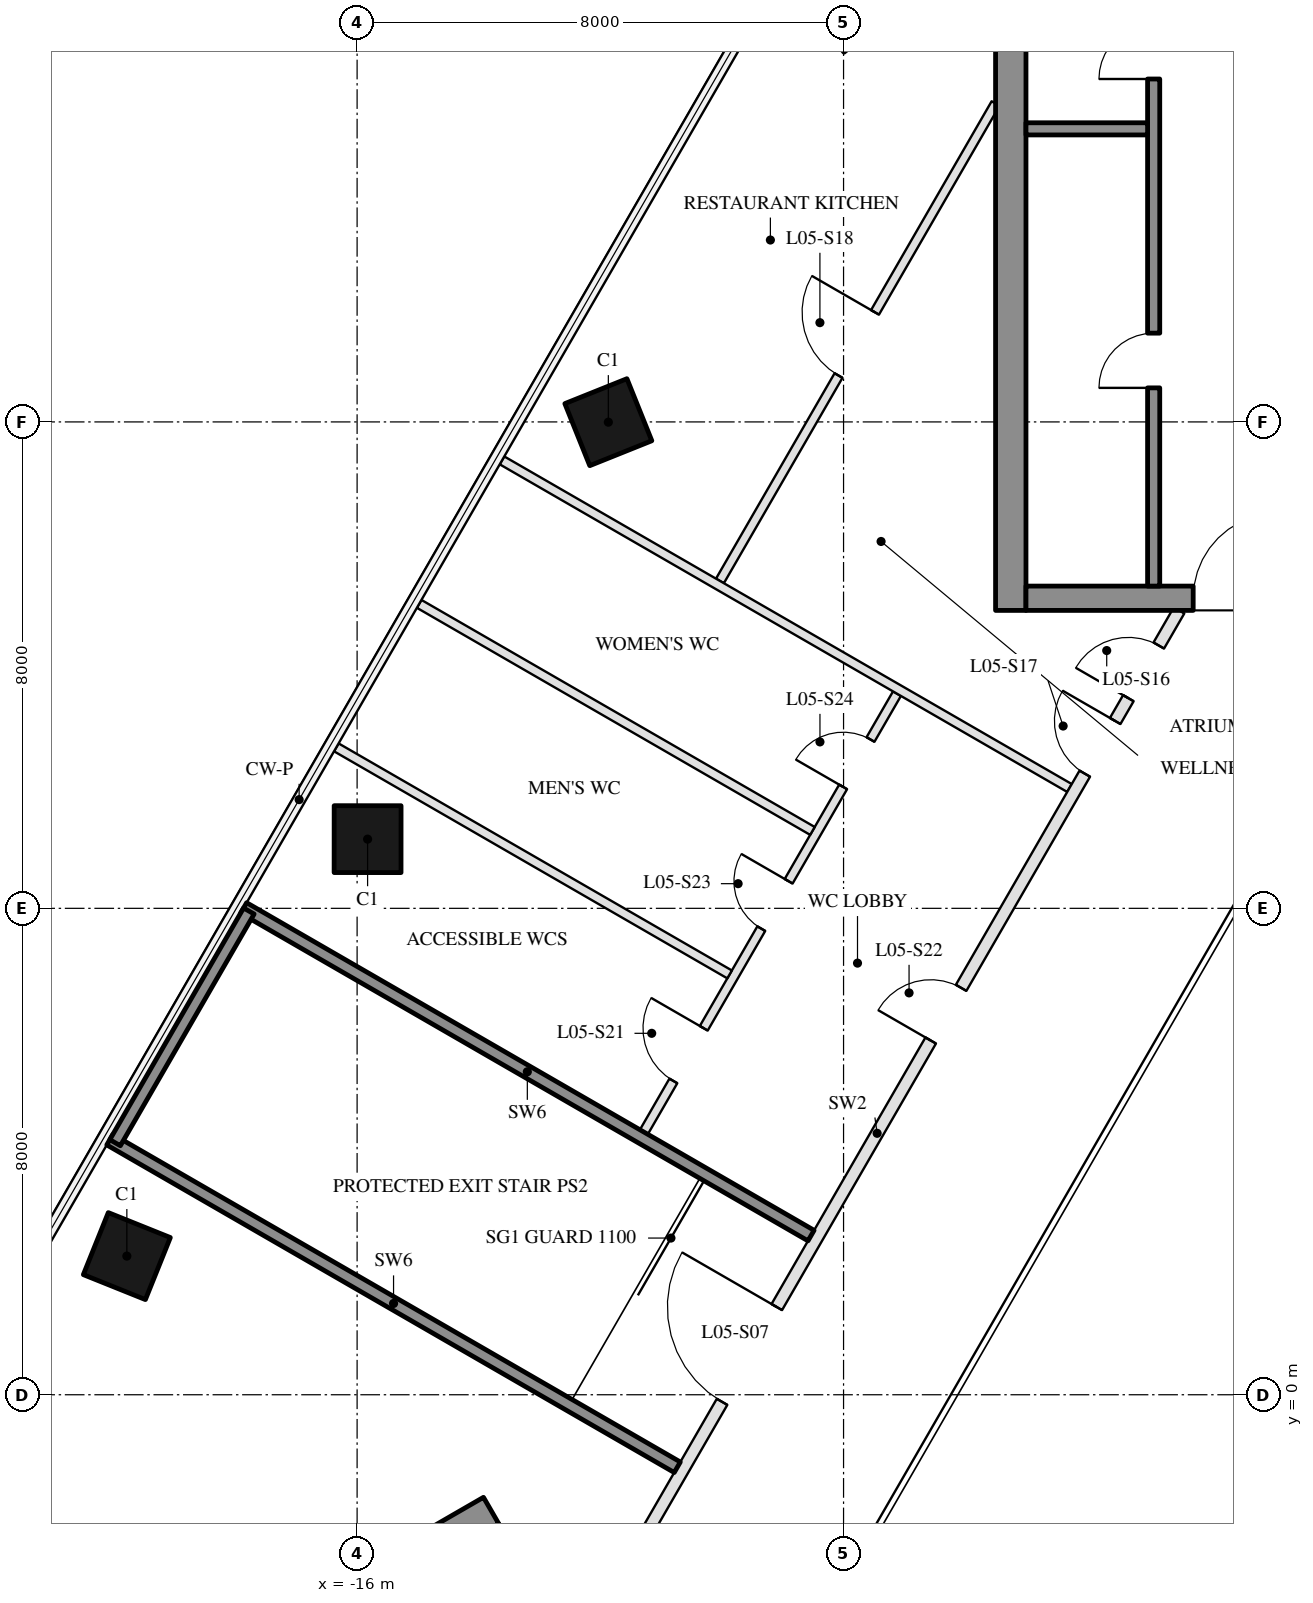
"""IFC4 building model, lengths in metres.
Left out: names, types, materials, properties, quantities, classifications, styles, units other than length and angle.
Written with IfcOpenShell. Run it as: python <this file> out.ifc"""

import sys

from ifc_helpers import new_model, si_unit, direction, frame, frame_2d, origin, origin_2d, place, context, subcontext, project, spatial, rectangle, hollow_rectangle, extrude, boolean, halfspace, element, fill, save


model = new_model("IFC4")
c1 = context("Model", 3, precision=1e-05, world=origin(), true_north=direction((0.0, 1.0)))
c2 = subcontext(c1, "Body", "Model", "MODEL_VIEW")
j1 = project(units=[si_unit("LENGTHUNIT", "METRE"), si_unit("PLANEANGLEUNIT", "RADIAN")], contexts=[c1])
p1 = place(None, origin())
s1 = spatial("IfcSite", under=j1, at=p1, CompositionType="ELEMENT")
p2 = place(p1, origin())
s2 = spatial("IfcBuilding", under=s1, at=p2, CompositionType="ELEMENT")
p3 = place(p2, frame((0.0, 0.0, 33.0)))
s3 = spatial("IfcBuildingStorey", under=s2, at=p3, CompositionType="ELEMENT", Elevation=33.0)
p4 = place(p3, frame((-7.909, 22.854, 0.0), z_axis=(0.004719641607, -0.012314467182, 0.999913035659), x_axis=(0.503343741395, 0.864046735596, 0.008265391899)))
e1 = element("IfcColumn", 1, at=p4, inside=s3, PredefinedType="COLUMN", context=c2, shape_type="SweptSolid", body=[
    boolean("DIFFERENCE", boolean("DIFFERENCE", extrude(hollow_rectangle(XDim=1.1, YDim=1.1, WallThickness=0.05, at=origin_2d()), origin(), (0.0, 0.0, 1.0), 4.5), halfspace(frame((0.0, 0.0, 0.012), z_axis=(0.0, 0.0, 1.0), x_axis=(1.0, 0.0, 0.0)), True)), halfspace(frame((0.0, 0.0, 4.493), z_axis=(0.0, 0.0, 1.0), x_axis=(1.0, 0.0, 0.0)), False)),
])
p5 = place(p3, frame((-11.868, 15.996, 0.0), z_axis=(0.006835520265, -0.008680025734, 0.999938964545), x_axis=(0.498767584387, 0.866726006756, 0.004114119219)))
e2 = element("IfcColumn", 2, at=p5, inside=s3, PredefinedType="COLUMN", context=c2, shape_type="SweptSolid", body=[
    boolean("DIFFERENCE", boolean("DIFFERENCE", extrude(hollow_rectangle(XDim=1.1, YDim=1.1, WallThickness=0.05, at=origin_2d()), origin(), (0.0, 0.0, 1.0), 4.5), halfspace(frame((0.0, 0.0, 0.01), z_axis=(0.0, 0.0, 1.0), x_axis=(1.0, 0.0, 0.0)), True)), halfspace(frame((0.0, 0.0, 4.494), z_axis=(0.0, 0.0, 1.0), x_axis=(1.0, 0.0, 0.0)), False)),
])
p6 = place(p3, frame((-15.827, 9.138, 0.0), z_axis=(0.008842855216, -0.005099560677, 0.999947897839), x_axis=(-0.500158591732, -0.865933821414, 6.948309e-06)))
e3 = element("IfcColumn", 3, at=p6, inside=s3, PredefinedType="COLUMN", context=c2, shape_type="SweptSolid", body=[
    boolean("DIFFERENCE", boolean("DIFFERENCE", extrude(hollow_rectangle(XDim=1.1, YDim=1.1, WallThickness=0.05, at=origin_2d()), origin(), (0.0, 0.0, 1.0), 4.5), halfspace(frame((0.0, 0.0, 0.01), z_axis=(0.0, 0.0, 1.0), x_axis=(1.0, 0.0, 0.0)), True)), halfspace(frame((0.0, 0.0, 4.494), z_axis=(0.0, 0.0, 1.0), x_axis=(1.0, 0.0, 0.0)), False)),
])
p7 = place(p3, frame((-19.787, 2.281, 0.0), z_axis=(0.010958529764, -0.001573254273, 0.99993871587), x_axis=(-0.501077464826, -0.865392580649, 0.004129842831)))
e4 = element("IfcColumn", 4, at=p7, inside=s3, PredefinedType="COLUMN", context=c2, shape_type="SweptSolid", body=[
    boolean("DIFFERENCE", boolean("DIFFERENCE", extrude(hollow_rectangle(XDim=1.1, YDim=1.1, WallThickness=0.05, at=origin_2d()), origin(), (0.0, 0.0, 1.0), 4.5), halfspace(frame((0.0, 0.0, 0.01), z_axis=(0.0, 0.0, 1.0), x_axis=(1.0, 0.0, 0.0)), True)), halfspace(frame((0.0, 0.0, 4.494), z_axis=(0.0, 0.0, 1.0), x_axis=(1.0, 0.0, 0.0)), False)),
])
p8 = place(p3, frame((-5.25, 12.9, 0.0), z_axis=(0.0, 0.0, 1.0), x_axis=(0.0, 1.0, 0.0)))
e5 = element("IfcWall", 5, at=p8, inside=s3, PredefinedType="SHEAR", context=c2, shape_type="SweptSolid", body=[
    extrude(rectangle(XDim=14.91, YDim=0.5, at=frame_2d((7.455, 0.0))), origin(), (0.0, 0.0, 1.0), 4.2),
])
p9 = place(p3, frame((5.0, 13.1, 0.0), z_axis=(0.0, 0.0, 1.0), x_axis=(-1.0, 0.0, 0.0)))
e6 = element("IfcWall", 6, at=p9, inside=s3, PredefinedType="SHEAR", context=c2, shape_type="SweptSolid", body=[
    extrude(rectangle(XDim=10.0, YDim=0.4, at=frame_2d((5.0, 0.0))), origin(), (0.0, 0.0, 1.0), 4.2),
])
p10 = place(p9, frame((3.55, 0.0, 0.0)))
e7 = element("IfcOpeningElement", 7, at=p10, cuts=e6, PredefinedType="OPENING", context=c2, shape_type="SweptSolid", body=[
    extrude(rectangle(XDim=1.1, YDim=2.1, at=frame_2d((0.55, 1.05))), frame((0.0, 0.21, 0.0), z_axis=(0.0, -1.0, 0.0), x_axis=(1.0, 0.0, 0.0)), (0.0, 0.0, 1.0), 0.42),
])
p11 = place(p9, frame((5.85, 0.0, 0.0)))
e8 = element("IfcOpeningElement", 8, at=p11, cuts=e6, PredefinedType="OPENING", context=c2, shape_type="SweptSolid", body=[
    extrude(rectangle(XDim=1.4, YDim=2.1, at=frame_2d((0.7, 1.05))), frame((0.0, 0.21, 0.0), z_axis=(0.0, -1.0, 0.0), x_axis=(1.0, 0.0, 0.0)), (0.0, 0.0, 1.0), 0.42),
])
p12 = place(p3, frame((-2.9, 13.3, 0.0), z_axis=(0.0, 0.0, 1.0), x_axis=(0.0, 1.0, 0.0)))
e9 = element("IfcWall", 9, at=p12, inside=s3, PredefinedType="SHEAR", context=c2, shape_type="SweptSolid", body=[
    extrude(rectangle(XDim=12.6, YDim=0.2, at=frame_2d((6.3, 0.0))), origin(), (0.0, 0.0, 1.0), 4.2),
])
p13 = place(p12, frame((3.26, 0.0, 0.0)))
e10 = element("IfcOpeningElement", 10, at=p13, cuts=e9, PredefinedType="OPENING", context=c2, shape_type="SweptSolid", body=[
    extrude(rectangle(XDim=0.9, YDim=2.1, at=frame_2d((0.45, 1.05))), frame((0.0, 0.11, 0.0), z_axis=(0.0, -1.0, 0.0), x_axis=(1.0, 0.0, 0.0)), (0.0, 0.0, 1.0), 0.22),
])
p14 = place(p12, frame((8.34, 0.0, 0.0)))
e11 = element("IfcOpeningElement", 11, at=p14, cuts=e9, PredefinedType="OPENING", context=c2, shape_type="SweptSolid", body=[
    extrude(rectangle(XDim=0.9, YDim=2.1, at=frame_2d((0.45, 1.05))), frame((0.0, 0.11, 0.0), z_axis=(0.0, -1.0, 0.0), x_axis=(1.0, 0.0, 0.0)), (0.0, 0.0, 1.0), 0.22),
])
p15 = place(p12, frame((10.51, 0.0, 0.0)))
e12 = element("IfcOpeningElement", 12, at=p15, cuts=e9, PredefinedType="OPENING", context=c2, shape_type="SweptSolid", body=[
    extrude(rectangle(XDim=0.9, YDim=2.1, at=frame_2d((0.45, 1.05))), frame((0.0, 0.11, 0.0), z_axis=(0.0, -1.0, 0.0), x_axis=(1.0, 0.0, 0.0)), (0.0, 0.0, 1.0), 0.22),
])
p16 = place(p3, frame((-3.0, 20.82, 0.0), z_axis=(0.0, 0.0, 1.0), x_axis=(-1.0, 0.0, 0.0)))
e13 = element("IfcWall", 13, at=p16, inside=s3, PredefinedType="SHEAR", context=c2, shape_type="SweptSolid", body=[
    extrude(rectangle(XDim=2.0, YDim=0.2, at=frame_2d((1.0, 0.0))), origin(), (0.0, 0.0, 1.0), 4.2),
])
p17 = place(p3, frame((-13.797, -1.903, 0.0), z_axis=(0.0, 0.0, 1.0), x_axis=(-0.866025798973, -0.499999315512, 0.0)))
e14 = element("IfcWall", 14, at=p17, inside=s3, PredefinedType="SHEAR", context=c2, shape_type="SweptSolid", body=[
    extrude(rectangle(XDim=14.91, YDim=0.5, at=frame_2d((7.455, 0.0))), origin(), (0.0, 0.0, 1.0), 4.2),
])
p18 = place(p3, frame((-5.5, 21.236, 0.0), z_axis=(0.0, 0.0, 1.0), x_axis=(-0.499999852422, -0.866025488988, 0.0)))
e15 = element("IfcWall", 15, at=p18, inside=s3, PredefinedType="PARTITIONING", context=c2, shape_type="SweptSolid", body=[
    extrude(rectangle(XDim=9.066, YDim=0.15, at=frame_2d((4.533, 0.0))), origin(), (0.0, 0.0, 1.0), 3.51),
])
p19 = place(p18, frame((3.965, 0.0, 0.0)))
e16 = element("IfcOpeningElement", 16, at=p19, cuts=e15, PredefinedType="OPENING", context=c2, shape_type="SweptSolid", body=[
    extrude(rectangle(XDim=1.2, YDim=2.1, at=frame_2d((0.6, 1.05))), frame((0.0, 0.085, 0.0), z_axis=(0.0, -1.0, 0.0), x_axis=(1.0, 0.0, 0.0)), (0.0, 0.0, 1.0), 0.17),
])
p20 = place(p3, frame((-7.122, 11.531, 0.0), z_axis=(0.0, 0.0, 1.0), x_axis=(-0.500018619731, -0.866014653411, 0.0)))
e17 = element("IfcWall", 17, at=p20, inside=s3, PredefinedType="PARTITIONING", context=c2, shape_type="SweptSolid", body=[
    extrude(rectangle(XDim=8.325, YDim=0.15, at=frame_2d((4.163, 0.0))), origin(), (0.0, 0.0, 1.0), 3.41),
])
p21 = place(p20, frame((6.354, 0.0, 0.0)))
e18 = element("IfcOpeningElement", 18, at=p21, cuts=e17, PredefinedType="OPENING", context=c2, shape_type="SweptSolid", body=[
    extrude(rectangle(XDim=1.0, YDim=2.1, at=frame_2d((0.5, 1.05))), frame((0.0, 0.085, 0.0), z_axis=(0.0, -1.0, 0.0), x_axis=(1.0, 0.0, 0.0)), (0.0, 0.0, 1.0), 0.17),
])
p22 = place(p20, frame((3.562, 0.0, 0.0)))
e19 = element("IfcOpeningElement", 19, at=p22, cuts=e17, PredefinedType="OPENING", context=c2, shape_type="SweptSolid", body=[
    extrude(rectangle(XDim=0.9, YDim=2.1, at=frame_2d((0.45, 1.05))), frame((0.0, 0.085, 0.0), z_axis=(0.0, -1.0, 0.0), x_axis=(1.0, 0.0, 0.0)), (0.0, 0.0, 1.0), 0.17),
])
p23 = place(p20, frame((0.871, 0.0, 0.0)))
e20 = element("IfcOpeningElement", 20, at=p23, cuts=e17, PredefinedType="OPENING", context=c2, shape_type="SweptSolid", body=[
    extrude(rectangle(XDim=0.9, YDim=2.1, at=frame_2d((0.45, 1.05))), frame((0.0, 0.085, 0.0), z_axis=(0.0, -1.0, 0.0), x_axis=(1.0, 0.0, 0.0)), (0.0, 0.0, 1.0), 0.17),
])
p24 = place(p3, frame((-13.617, 15.367, 0.0), z_axis=(0.0, 0.0, 1.0), x_axis=(0.866027503583, -0.499996363024, 0.0)))
e21 = element("IfcWall", 21, at=p24, inside=s3, PredefinedType="PARTITIONING", context=c2, shape_type="SweptSolid", body=[
    extrude(rectangle(XDim=10.776, YDim=0.15, at=frame_2d((5.388, 0.0))), origin(), (0.0, 0.0, 1.0), 4.2),
])
p25 = place(p3, frame((-14.979, 13.007, 0.0), z_axis=(0.0, 0.0, 1.0), x_axis=(0.866019543016, -0.500010151011, 0.0)))
e22 = element("IfcWall", 22, at=p25, inside=s3, PredefinedType="PARTITIONING", context=c2, shape_type="SweptSolid", body=[
    extrude(rectangle(XDim=7.468, YDim=0.15, at=frame_2d((3.734, 0.0))), origin(), (0.0, 0.0, 1.0), 3.41),
])
p26 = place(p3, frame((-16.342, 10.647, 0.0), z_axis=(0.0, 0.0, 1.0), x_axis=(0.866013560478, -0.500020512648, 0.0)))
e23 = element("IfcWall", 23, at=p26, inside=s3, PredefinedType="PARTITIONING", context=c2, shape_type="SweptSolid", body=[
    extrude(rectangle(XDim=7.469, YDim=0.15, at=frame_2d((3.734, 0.0))), origin(), (0.0, 0.0, 1.0), 4.2),
])
p27 = place(p3, frame((-17.867, 8.006, 0.0), z_axis=(0.0, 0.0, 1.0), x_axis=(0.866017693218, -0.500013354855, 0.0)))
e24 = element("IfcWall", 24, at=p27, inside=s3, PredefinedType="SOLIDWALL", context=c2, shape_type="SweptSolid", body=[
    extrude(rectangle(XDim=10.776, YDim=0.2, at=frame_2d((5.388, 0.0))), origin(), (0.0, 0.0, 1.0), 4.2),
])
p28 = place(p3, frame((-20.067, 4.196, 0.0), z_axis=(0.0, 0.0, 1.0), x_axis=(0.866023357302, -0.500003544594, 0.0)))
e25 = element("IfcWall", 25, at=p28, inside=s3, PredefinedType="SOLIDWALL", context=c2, shape_type="SweptSolid", body=[
    extrude(rectangle(XDim=10.776, YDim=0.2, at=frame_2d((5.388, 0.0))), origin(), (0.0, 0.0, 1.0), 4.2),
])
p29 = place(p3, frame((-2.482, 12.9, 0.0), z_axis=(0.0, 0.0, 1.0), x_axis=(-0.50000478328, -0.866022642139, 0.0)))
e26 = element("IfcWall", 26, at=p29, inside=s3, PredefinedType="PARTITIONING", context=c2, shape_type="SweptSolid", body=[
    extrude(rectangle(XDim=19.861, YDim=0.2, at=frame_2d((9.931, 0.0))), origin(), (0.0, 0.0, 1.0), 3.41),
])
p30 = place(p29, frame((13.23, 0.0, 0.0)))
e27 = element("IfcOpeningElement", 27, at=p30, cuts=e26, PredefinedType="OPENING", context=c2, shape_type="SweptSolid", body=[
    extrude(rectangle(XDim=1.8, YDim=2.1, at=frame_2d((0.9, 1.05))), frame((0.0, 0.11, 0.0), z_axis=(0.0, -1.0, 0.0), x_axis=(1.0, 0.0, 0.0)), (0.0, 0.0, 1.0), 0.22),
])
p31 = place(p29, frame((0.667, 0.0, 0.0)))
e28 = element("IfcOpeningElement", 28, at=p31, cuts=e26, PredefinedType="OPENING", context=c2, shape_type="SweptSolid", body=[
    extrude(rectangle(XDim=1.0, YDim=2.1, at=frame_2d((0.5, 1.05))), frame((0.0, 0.11, 0.0), z_axis=(0.0, -1.0, 0.0), x_axis=(1.0, 0.0, 0.0)), (0.0, 0.0, 1.0), 0.22),
])
p32 = place(p29, frame((2.1, 0.0, 0.0)))
e29 = element("IfcOpeningElement", 29, at=p32, cuts=e26, PredefinedType="OPENING", context=c2, shape_type="SweptSolid", body=[
    extrude(rectangle(XDim=1.0, YDim=2.1, at=frame_2d((0.5, 1.05))), frame((0.0, 0.11, 0.0), z_axis=(0.0, -1.0, 0.0), x_axis=(1.0, 0.0, 0.0)), (0.0, 0.0, 1.0), 0.22),
])
p33 = place(p29, frame((17.49, 0.0, 0.0)))
e30 = element("IfcOpeningElement", 30, at=p33, cuts=e26, PredefinedType="OPENING", context=c2, shape_type="SweptSolid", body=[
    extrude(rectangle(XDim=1.2, YDim=2.1, at=frame_2d((0.6, 1.05))), frame((0.0, 0.11, 0.0), z_axis=(0.0, -1.0, 0.0), x_axis=(1.0, 0.0, 0.0)), (0.0, 0.0, 1.0), 0.22),
])
p34 = place(p29, frame((7.168, 0.0, 0.0)))
e31 = element("IfcOpeningElement", 31, at=p34, cuts=e26, PredefinedType="OPENING", context=c2, shape_type="SweptSolid", body=[
    extrude(rectangle(XDim=1.0, YDim=2.1, at=frame_2d((0.5, 1.05))), frame((0.0, 0.11, 0.0), z_axis=(0.0, -1.0, 0.0), x_axis=(1.0, 0.0, 0.0)), (0.0, 0.0, 1.0), 0.22),
])
p35 = place(p3, frame((-17.78, 7.956, 0.0), z_axis=(0.0, 0.0, 1.0), x_axis=(-0.499988222896, -0.866032203192, 0.0)))
e32 = element("IfcWall", 32, at=p35, inside=s3, PredefinedType="SOLIDWALL", context=c2, shape_type="SweptSolid", body=[
    extrude(rectangle(XDim=4.4, YDim=0.2, at=frame_2d((2.2, 0.0))), origin(), (0.0, 0.0, 1.0), 4.2),
])
p36 = place(p13, origin())
e33 = element("IfcDoor", 33, at=p36, inside=s3, OperationType="SINGLE_SWING_LEFT", PredefinedType="DOOR", context=c2, shape_type="SweptSolid", body=[
    extrude(rectangle(XDim=0.9, YDim=2.1, at=frame_2d((0.45, 1.05))), frame((0.0, 0.025, 0.0), z_axis=(0.0, -1.0, 0.0), x_axis=(1.0, 0.0, 0.0)), (0.0, 0.0, 1.0), 0.05),
])
fill(e10, e33)
p37 = place(p14, origin())
e34 = element("IfcDoor", 34, at=p37, inside=s3, OperationType="SINGLE_SWING_LEFT", PredefinedType="DOOR", context=c2, shape_type="SweptSolid", body=[
    extrude(rectangle(XDim=0.9, YDim=2.1, at=frame_2d((0.45, 1.05))), frame((0.0, 0.025, 0.0), z_axis=(0.0, -1.0, 0.0), x_axis=(1.0, 0.0, 0.0)), (0.0, 0.0, 1.0), 0.05),
])
fill(e11, e34)
p38 = place(p11, frame((1.4, 0.0, 0.0), z_axis=(0.0, 0.0, 1.0), x_axis=(-1.0, 0.0, 0.0)))
e35 = element("IfcDoor", 35, at=p38, inside=s3, OperationType="DOUBLE_DOOR_SINGLE_SWING", PredefinedType="DOOR", context=c2, shape_type="SweptSolid", body=[
    extrude(rectangle(XDim=1.4, YDim=2.1, at=frame_2d((0.7, 1.05))), frame((0.0, 0.025, 0.0), z_axis=(0.0, -1.0, 0.0), x_axis=(1.0, 0.0, 0.0)), (0.0, 0.0, 1.0), 0.05),
])
fill(e8, e35)
p39 = place(p30, frame((1.8, 0.0, 0.0), z_axis=(0.0, 0.0, 1.0), x_axis=(-1.0, 0.0, 0.0)))
e36 = element("IfcDoor", 36, at=p39, inside=s3, OperationType="DOUBLE_DOOR_SINGLE_SWING", PredefinedType="DOOR", context=c2, shape_type="SweptSolid", body=[
    extrude(rectangle(XDim=1.8, YDim=2.1, at=frame_2d((0.9, 1.05))), frame((0.0, 0.025, 0.0), z_axis=(0.0, -1.0, 0.0), x_axis=(1.0, 0.0, 0.0)), (0.0, 0.0, 1.0), 0.05),
])
fill(e27, e36)
p40 = place(p31, frame((1.0, 0.0, 0.0), z_axis=(0.0, 0.0, 1.0), x_axis=(-1.0, 0.0, 0.0)))
e37 = element("IfcDoor", 37, at=p40, inside=s3, OperationType="SINGLE_SWING_LEFT", PredefinedType="DOOR", context=c2, shape_type="SweptSolid", body=[
    extrude(rectangle(XDim=1.0, YDim=2.1, at=frame_2d((0.5, 1.05))), frame((0.0, 0.025, 0.0), z_axis=(0.0, -1.0, 0.0), x_axis=(1.0, 0.0, 0.0)), (0.0, 0.0, 1.0), 0.05),
])
fill(e28, e37)
p41 = place(p32, frame((1.0, 0.0, 0.0), z_axis=(0.0, 0.0, 1.0), x_axis=(-1.0, 0.0, 0.0)))
e38 = element("IfcDoor", 38, at=p41, inside=s3, OperationType="SINGLE_SWING_RIGHT", PredefinedType="DOOR", context=c2, shape_type="SweptSolid", body=[
    extrude(rectangle(XDim=1.0, YDim=2.1, at=frame_2d((0.5, 1.05))), frame((0.0, 0.025, 0.0), z_axis=(0.0, -1.0, 0.0), x_axis=(1.0, 0.0, 0.0)), (0.0, 0.0, 1.0), 0.05),
])
fill(e29, e38)
p42 = place(p19, frame((1.2, 0.0, 0.0), z_axis=(0.0, 0.0, 1.0), x_axis=(-1.0, 0.0, 0.0)))
e39 = element("IfcDoor", 39, at=p42, inside=s3, OperationType="SINGLE_SWING_RIGHT", PredefinedType="DOOR", context=c2, shape_type="SweptSolid", body=[
    extrude(rectangle(XDim=1.2, YDim=2.1, at=frame_2d((0.6, 1.05))), frame((0.0, 0.025, 0.0), z_axis=(0.0, -1.0, 0.0), x_axis=(1.0, 0.0, 0.0)), (0.0, 0.0, 1.0), 0.05),
])
fill(e16, e39)
p43 = place(p21, frame((1.0, 0.0, 0.0), z_axis=(0.0, 0.0, 1.0), x_axis=(-1.0, 0.0, 0.0)))
e40 = element("IfcDoor", 40, at=p43, inside=s3, OperationType="SINGLE_SWING_RIGHT", PredefinedType="DOOR", context=c2, shape_type="SweptSolid", body=[
    extrude(rectangle(XDim=1.0, YDim=2.1, at=frame_2d((0.5, 1.05))), frame((0.0, 0.025, 0.0), z_axis=(0.0, -1.0, 0.0), x_axis=(1.0, 0.0, 0.0)), (0.0, 0.0, 1.0), 0.05),
])
fill(e18, e40)
p44 = place(p34, frame((1.0, 0.0, 0.0), z_axis=(0.0, 0.0, 1.0), x_axis=(-1.0, 0.0, 0.0)))
e41 = element("IfcDoor", 41, at=p44, inside=s3, OperationType="SINGLE_SWING_LEFT", PredefinedType="DOOR", context=c2, shape_type="SweptSolid", body=[
    extrude(rectangle(XDim=1.0, YDim=2.1, at=frame_2d((0.5, 1.05))), frame((0.0, 0.025, 0.0), z_axis=(0.0, -1.0, 0.0), x_axis=(1.0, 0.0, 0.0)), (0.0, 0.0, 1.0), 0.05),
])
fill(e31, e41)
p45 = place(p22, frame((0.9, 0.0, 0.0), z_axis=(0.0, 0.0, 1.0), x_axis=(-1.0, 0.0, 0.0)))
e42 = element("IfcDoor", 42, at=p45, inside=s3, OperationType="SINGLE_SWING_RIGHT", PredefinedType="DOOR", context=c2, shape_type="SweptSolid", body=[
    extrude(rectangle(XDim=0.9, YDim=2.1, at=frame_2d((0.45, 1.05))), frame((0.0, 0.025, 0.0), z_axis=(0.0, -1.0, 0.0), x_axis=(1.0, 0.0, 0.0)), (0.0, 0.0, 1.0), 0.05),
])
fill(e19, e42)
p46 = place(p23, frame((0.9, 0.0, 0.0), z_axis=(0.0, 0.0, 1.0), x_axis=(-1.0, 0.0, 0.0)))
e43 = element("IfcDoor", 43, at=p46, inside=s3, OperationType="SINGLE_SWING_LEFT", PredefinedType="DOOR", context=c2, shape_type="SweptSolid", body=[
    extrude(rectangle(XDim=0.9, YDim=2.1, at=frame_2d((0.45, 1.05))), frame((0.0, 0.025, 0.0), z_axis=(0.0, -1.0, 0.0), x_axis=(1.0, 0.0, 0.0)), (0.0, 0.0, 1.0), 0.05),
])
fill(e20, e43)
save(model, sys.argv[1])
